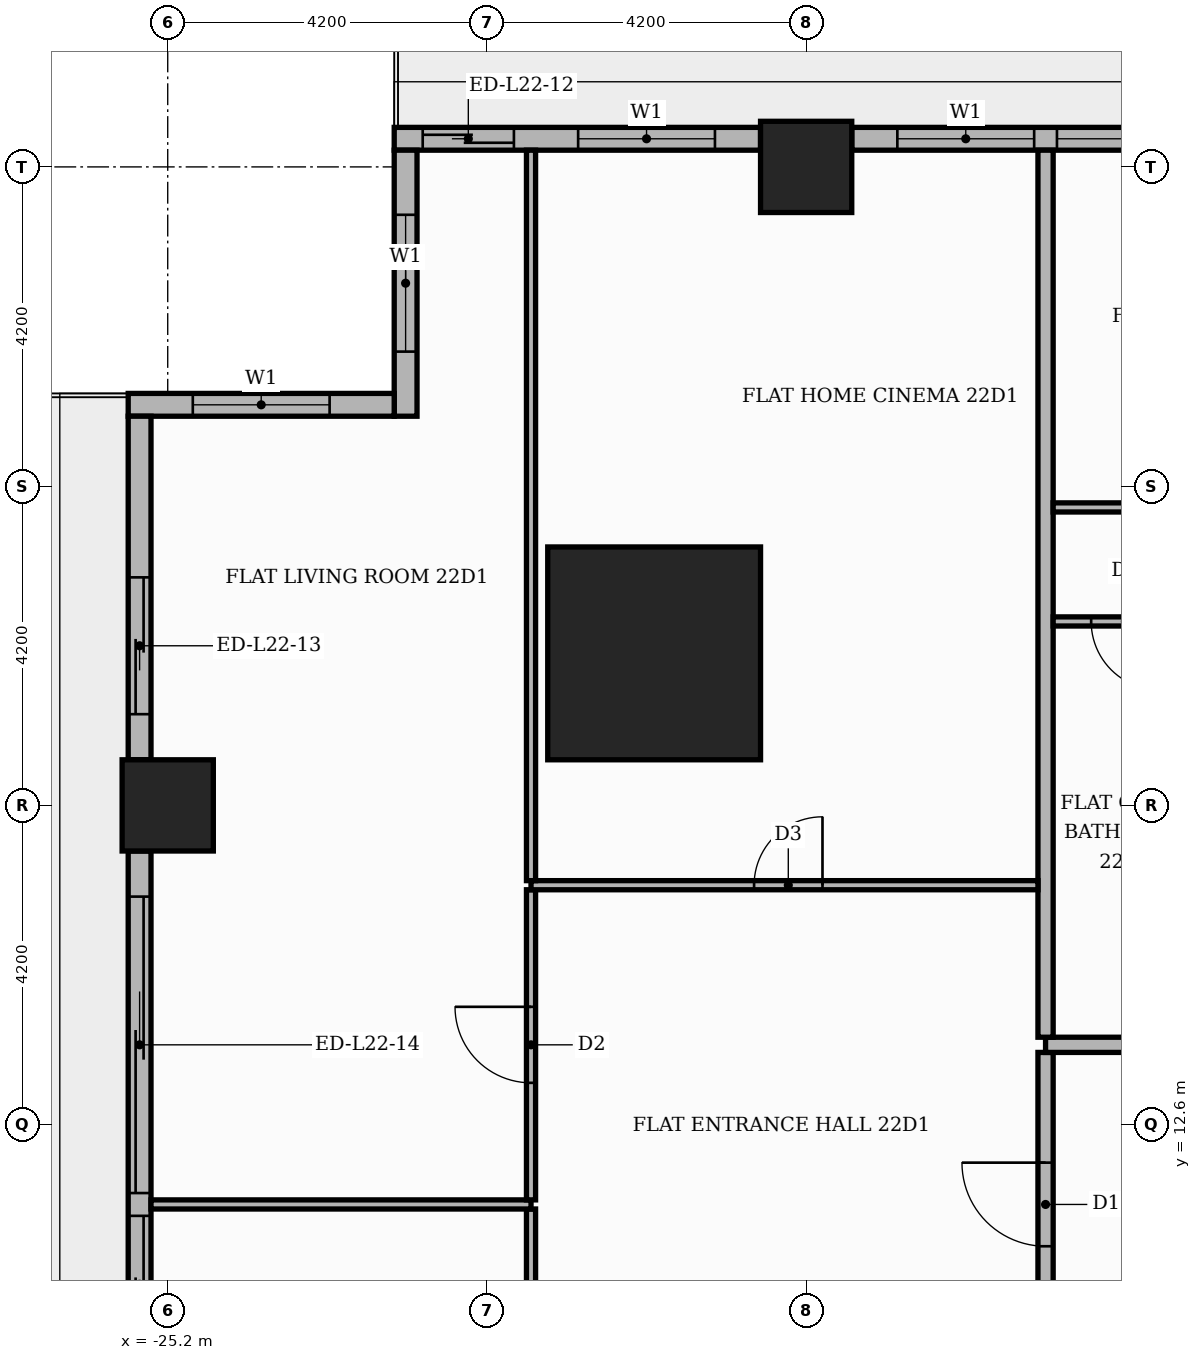
"""IFC4 building model, lengths in metres.
Left out: names, types, materials, properties, quantities, classifications, styles, units other than length and angle.
Written with IfcOpenShell. Run it as: python <this file> out.ifc"""

import sys

from ifc_helpers import new_model, si_unit, direction, frame, frame_2d, origin, origin_2d, place, context, subcontext, project, spatial, rectangle, extrude, element, fill, save


model = new_model("IFC4")
c1 = context("Model", 3, precision=1e-05, world=origin(), true_north=direction((0.0, 1.0)))
c2 = subcontext(c1, "Body", "Model", "MODEL_VIEW")
j1 = project(units=[si_unit("LENGTHUNIT", "METRE"), si_unit("PLANEANGLEUNIT", "RADIAN")], contexts=[c1])
p1 = place(None, origin())
s1 = spatial("IfcSite", under=j1, at=p1, CompositionType="ELEMENT")
p2 = place(p1, origin())
s2 = spatial("IfcBuilding", under=s1, at=p2, CompositionType="ELEMENT")
p3 = place(p2, frame((0.0, 0.0, 94.8)))
s3 = spatial("IfcBuildingStorey", under=s2, at=p3, CompositionType="ELEMENT", Elevation=94.8)
p4 = place(p3, frame((-18.8, 18.8, 0.0), z_axis=(0.0, 0.0, 1.0), x_axis=(1.0, 0.0, 0.0)))
e1 = element("IfcColumn", 1, at=p4, inside=s3, PredefinedType="COLUMN", context=c2, shape_type="SweptSolid", body=[
    extrude(rectangle(XDim=2.8, YDim=2.8, at=origin_2d()), origin(), (0.0, 0.0, 1.0), 3.9),
])
for number, where, z_axis, x_axis in (
    (2, (-16.8, 25.2, 0.0), (0.0, 0.0, 1.0), (1.0, 0.0, 0.0)),
    (3, (-25.2, 16.8, 0.0), (0.0, 0.0, 1.0), (1.0, 0.0, 0.0)),
):
    element("IfcColumn", number, at=place(p3, frame(where, z_axis=z_axis, x_axis=x_axis)), inside=s3, PredefinedType="COLUMN", context=c2, shape_type="SweptSolid", body=[
        extrude(rectangle(XDim=1.2, YDim=1.2, at=origin_2d()), origin(), (0.0, 0.0, 1.0), 3.9),
    ])
p5 = place(p3, frame((-9.0, 25.57, 0.0), z_axis=(0.0, 0.0, 1.0), x_axis=(-1.0, 0.0, 0.0)))
e4 = element("IfcWall", 4, at=p5, inside=s3, PredefinedType="STANDARD", context=c2, shape_type="SweptSolid", body=[
    extrude(rectangle(XDim=7.2, YDim=0.3, at=frame_2d((3.6, 0.0))), origin(), (0.0, 0.0, 1.0), 3.48),
])
p6 = place(p5, frame((0.6, 0.0, 0.9)))
e5 = element("IfcOpeningElement", 5, at=p6, cuts=e4, PredefinedType="OPENING", context=c2, shape_type="SweptSolid", body=[
    extrude(rectangle(XDim=3.9, YDim=2.1, at=frame_2d((1.95, 1.05))), frame((0.0, 0.16, 0.0), z_axis=(0.0, -1.0, 0.0), x_axis=(1.0, 0.0, 0.0)), (0.0, 0.0, 1.0), 0.32),
])
p7 = place(p5, frame((4.8, 0.0, 0.9)))
e6 = element("IfcOpeningElement", 6, at=p7, cuts=e4, PredefinedType="OPENING", context=c2, shape_type="SweptSolid", body=[
    extrude(rectangle(XDim=1.8, YDim=2.1, at=frame_2d((0.9, 1.05))), frame((0.0, 0.16, 0.0), z_axis=(0.0, -1.0, 0.0), x_axis=(1.0, 0.0, 0.0)), (0.0, 0.0, 1.0), 0.32),
])
p8 = place(p3, frame((-17.4, 25.57, 0.0), z_axis=(0.0, 0.0, 1.0), x_axis=(-1.0, 0.0, 0.0)))
e7 = element("IfcWall", 7, at=p8, inside=s3, PredefinedType="STANDARD", context=c2, shape_type="SweptSolid", body=[
    extrude(rectangle(XDim=4.82, YDim=0.3, at=frame_2d((2.41, 0.0))), origin(), (0.0, 0.0, 1.0), 3.48),
])
p9 = place(p8, frame((0.6, 0.0, 0.9)))
e8 = element("IfcOpeningElement", 8, at=p9, cuts=e7, PredefinedType="OPENING", context=c2, shape_type="SweptSolid", body=[
    extrude(rectangle(XDim=1.8, YDim=2.1, at=frame_2d((0.9, 1.05))), frame((0.0, 0.16, 0.0), z_axis=(0.0, -1.0, 0.0), x_axis=(1.0, 0.0, 0.0)), (0.0, 0.0, 1.0), 0.32),
])
p10 = place(p8, frame((3.245, 0.0, 0.0)))
e9 = element("IfcOpeningElement", 9, at=p10, cuts=e7, PredefinedType="OPENING", context=c2, shape_type="SweptSolid", body=[
    extrude(rectangle(XDim=1.2, YDim=2.4, at=frame_2d((0.6, 1.2))), frame((0.0, 0.16, 0.0), z_axis=(0.0, -1.0, 0.0), x_axis=(1.0, 0.0, 0.0)), (0.0, 0.0, 1.0), 0.32),
])
p11 = place(p3, frame((-22.07, 25.42, 0.0), z_axis=(0.0, 0.0, 1.0), x_axis=(0.0, -1.0, 0.0)))
e10 = element("IfcWall", 10, at=p11, inside=s3, PredefinedType="STANDARD", context=c2, shape_type="SweptSolid", body=[
    extrude(rectangle(XDim=3.5, YDim=0.3, at=frame_2d((1.75, 0.0))), origin(), (0.0, 0.0, 1.0), 3.48),
])
p12 = place(p11, frame((0.85, 0.0, 0.9)))
e11 = element("IfcOpeningElement", 11, at=p12, cuts=e10, PredefinedType="OPENING", context=c2, shape_type="SweptSolid", body=[
    extrude(rectangle(XDim=1.8, YDim=2.1, at=frame_2d((0.9, 1.05))), frame((0.0, 0.16, 0.0), z_axis=(0.0, -1.0, 0.0), x_axis=(1.0, 0.0, 0.0)), (0.0, 0.0, 1.0), 0.32),
])
p13 = place(p3, frame((-22.22, 22.07, 0.0), z_axis=(0.0, 0.0, 1.0), x_axis=(-1.0, 0.0, 0.0)))
e12 = element("IfcWall", 12, at=p13, inside=s3, PredefinedType="STANDARD", context=c2, shape_type="SweptSolid", body=[
    extrude(rectangle(XDim=3.5, YDim=0.3, at=frame_2d((1.75, 0.0))), origin(), (0.0, 0.0, 1.0), 3.48),
])
p14 = place(p13, frame((0.85, 0.0, 0.9)))
e13 = element("IfcOpeningElement", 13, at=p14, cuts=e12, PredefinedType="OPENING", context=c2, shape_type="SweptSolid", body=[
    extrude(rectangle(XDim=1.8, YDim=2.1, at=frame_2d((0.9, 1.05))), frame((0.0, 0.16, 0.0), z_axis=(0.0, -1.0, 0.0), x_axis=(1.0, 0.0, 0.0)), (0.0, 0.0, 1.0), 0.32),
])
p15 = place(p3, frame((-25.57, 21.92, 0.0), z_axis=(0.0, 0.0, 1.0), x_axis=(0.0, -1.0, 0.0)))
e14 = element("IfcWall", 14, at=p15, inside=s3, PredefinedType="STANDARD", context=c2, shape_type="SweptSolid", body=[
    extrude(rectangle(XDim=4.52, YDim=0.3, at=frame_2d((2.26, 0.0))), origin(), (0.0, 0.0, 1.0), 3.48),
])
p16 = place(p15, frame((2.12, 0.0, 0.0)))
e15 = element("IfcOpeningElement", 15, at=p16, cuts=e14, PredefinedType="OPENING", context=c2, shape_type="SweptSolid", body=[
    extrude(rectangle(XDim=1.8, YDim=2.4, at=frame_2d((0.9, 1.2))), frame((0.0, 0.16, 0.0), z_axis=(0.0, -1.0, 0.0), x_axis=(1.0, 0.0, 0.0)), (0.0, 0.0, 1.0), 0.32),
])
p17 = place(p3, frame((-25.57, 16.2, 0.0), z_axis=(0.0, 0.0, 1.0), x_axis=(0.0, -1.0, 0.0)))
e16 = element("IfcWall", 16, at=p17, inside=s3, PredefinedType="STANDARD", context=c2, shape_type="SweptSolid", body=[
    extrude(rectangle(XDim=7.2, YDim=0.3, at=frame_2d((3.6, 0.0))), origin(), (0.0, 0.0, 1.0), 3.48),
])
p18 = place(p17, frame((0.6, 0.0, 0.0)))
e17 = element("IfcOpeningElement", 17, at=p18, cuts=e16, PredefinedType="OPENING", context=c2, shape_type="SweptSolid", body=[
    extrude(rectangle(XDim=3.9, YDim=2.4, at=frame_2d((1.95, 1.2))), frame((0.0, 0.16, 0.0), z_axis=(0.0, -1.0, 0.0), x_axis=(1.0, 0.0, 0.0)), (0.0, 0.0, 1.0), 0.32),
])
p19 = place(p17, frame((4.8, 0.0, 0.0)))
e18 = element("IfcOpeningElement", 18, at=p19, cuts=e16, PredefinedType="OPENING", context=c2, shape_type="SweptSolid", body=[
    extrude(rectangle(XDim=1.8, YDim=2.4, at=frame_2d((0.9, 1.2))), frame((0.0, 0.16, 0.0), z_axis=(0.0, -1.0, 0.0), x_axis=(1.0, 0.0, 0.0)), (0.0, 0.0, 1.0), 0.32),
])
p20 = place(p3, frame((-13.65, -13.55, 0.0), z_axis=(0.0, 0.0, 1.0), x_axis=(0.0, 1.0, 0.0)))
e19 = element("IfcWall", 19, at=p20, inside=s3, PredefinedType="PARTITIONING", context=c2, shape_type="SweptSolid", body=[
    extrude(rectangle(XDim=27.1, YDim=0.2, at=frame_2d((13.55, 0.0))), origin(), (0.0, 0.0, 1.0), 3.48),
])
p21 = place(p20, frame((24.55, 0.0, 0.0)))
e20 = element("IfcOpeningElement", 20, at=p21, cuts=e19, PredefinedType="OPENING", context=c2, shape_type="SweptSolid", body=[
    extrude(rectangle(XDim=1.1, YDim=2.4, at=frame_2d((0.55, 1.2))), frame((0.0, 0.11, 0.0), z_axis=(0.0, -1.0, 0.0), x_axis=(1.0, 0.0, 0.0)), (0.0, 0.0, 1.0), 0.22),
])
p22 = place(p3, frame((-20.42, 7.41, 0.0), z_axis=(0.0, 0.0, 1.0), x_axis=(0.0, 1.0, 0.0)))
e21 = element("IfcWall", 21, at=p22, inside=s3, PredefinedType="PARTITIONING", context=c2, shape_type="SweptSolid", body=[
    extrude(rectangle(XDim=4.08, YDim=0.12, at=frame_2d((2.04, 0.0))), origin(), (0.0, 0.0, 1.0), 3.48),
])
p23 = place(p22, frame((1.54, 0.0, 0.0)))
e22 = element("IfcOpeningElement", 22, at=p23, cuts=e21, PredefinedType="OPENING", context=c2, shape_type="SweptSolid", body=[
    extrude(rectangle(XDim=1.0, YDim=2.1, at=frame_2d((0.5, 1.05))), frame((0.0, 0.07, 0.0), z_axis=(0.0, -1.0, 0.0), x_axis=(1.0, 0.0, 0.0)), (0.0, 0.0, 1.0), 0.14),
])
p24 = place(p3, frame((-25.42, 11.55, 0.0), z_axis=(0.0, 0.0, 1.0), x_axis=(1.0, 0.0, 0.0)))
e23 = element("IfcWall", 23, at=p24, inside=s3, PredefinedType="PARTITIONING", context=c2, shape_type="SweptSolid", body=[
    extrude(rectangle(XDim=5.0, YDim=0.12, at=frame_2d((2.5, 0.0))), origin(), (0.0, 0.0, 1.0), 3.48),
])
p25 = place(p3, frame((-20.42, 11.61, 0.0), z_axis=(0.0, 0.0, 1.0), x_axis=(0.0, 1.0, 0.0)))
e24 = element("IfcWall", 24, at=p25, inside=s3, PredefinedType="PARTITIONING", context=c2, shape_type="SweptSolid", body=[
    extrude(rectangle(XDim=4.08, YDim=0.12, at=frame_2d((2.04, 0.0))), origin(), (0.0, 0.0, 1.0), 3.48),
])
p26 = place(p25, frame((1.54, 0.0, 0.0)))
e25 = element("IfcOpeningElement", 25, at=p26, cuts=e24, PredefinedType="OPENING", context=c2, shape_type="SweptSolid", body=[
    extrude(rectangle(XDim=1.0, YDim=2.1, at=frame_2d((0.5, 1.05))), frame((0.0, 0.07, 0.0), z_axis=(0.0, -1.0, 0.0), x_axis=(1.0, 0.0, 0.0)), (0.0, 0.0, 1.0), 0.14),
])
p27 = place(p3, frame((-13.65, 13.65, 0.0), z_axis=(0.0, 0.0, 1.0), x_axis=(1.0, 0.0, 0.0)))
e26 = element("IfcWall", 26, at=p27, inside=s3, PredefinedType="PARTITIONING", context=c2, shape_type="SweptSolid", body=[
    extrude(rectangle(XDim=39.07, YDim=0.2, at=frame_2d((19.535, 0.0))), origin(), (0.0, 0.0, 1.0), 3.48),
])
p28 = place(p27, frame((24.65, 0.0, 0.0)))
e27 = element("IfcOpeningElement", 27, at=p28, cuts=e26, PredefinedType="OPENING", context=c2, shape_type="SweptSolid", body=[
    extrude(rectangle(XDim=1.1, YDim=2.4, at=frame_2d((0.55, 1.2))), frame((0.0, 0.11, 0.0), z_axis=(0.0, -1.0, 0.0), x_axis=(1.0, 0.0, 0.0)), (0.0, 0.0, 1.0), 0.22),
])
p29 = place(p27, frame((16.25, 0.0, 0.0)))
e28 = element("IfcOpeningElement", 28, at=p29, cuts=e26, PredefinedType="OPENING", context=c2, shape_type="SweptSolid", body=[
    extrude(rectangle(XDim=1.1, YDim=2.4, at=frame_2d((0.55, 1.2))), frame((0.0, 0.11, 0.0), z_axis=(0.0, -1.0, 0.0), x_axis=(1.0, 0.0, 0.0)), (0.0, 0.0, 1.0), 0.22),
])
p30 = place(p3, frame((-13.65, 13.75, 0.0), z_axis=(0.0, 0.0, 1.0), x_axis=(0.0, 1.0, 0.0)))
e29 = element("IfcWall", 29, at=p30, inside=s3, PredefinedType="PARTITIONING", context=c2, shape_type="SweptSolid", body=[
    extrude(rectangle(XDim=11.67, YDim=0.2, at=frame_2d((5.835, 0.0))), origin(), (0.0, 0.0, 1.0), 3.48),
])
p31 = place(p3, frame((-20.42, 15.75, 0.0), z_axis=(0.0, 0.0, 1.0), x_axis=(1.0, 0.0, 0.0)))
e30 = element("IfcWall", 30, at=p31, inside=s3, PredefinedType="PARTITIONING", context=c2, shape_type="SweptSolid", body=[
    extrude(rectangle(XDim=6.67, YDim=0.12, at=frame_2d((3.335, 0.0))), origin(), (0.0, 0.0, 1.0), 3.48),
])
p32 = place(p31, frame((2.935, 0.0, 0.0)))
e31 = element("IfcOpeningElement", 31, at=p32, cuts=e30, PredefinedType="OPENING", context=c2, shape_type="SweptSolid", body=[
    extrude(rectangle(XDim=0.9, YDim=2.1, at=frame_2d((0.45, 1.05))), frame((0.0, 0.07, 0.0), z_axis=(0.0, -1.0, 0.0), x_axis=(1.0, 0.0, 0.0)), (0.0, 0.0, 1.0), 0.14),
])
p33 = place(p3, frame((-20.42, 15.81, 0.0), z_axis=(0.0, 0.0, 1.0), x_axis=(0.0, 1.0, 0.0)))
e32 = element("IfcWall", 32, at=p33, inside=s3, PredefinedType="PARTITIONING", context=c2, shape_type="SweptSolid", body=[
    extrude(rectangle(XDim=9.61, YDim=0.12, at=frame_2d((4.805, 0.0))), origin(), (0.0, 0.0, 1.0), 3.48),
])
p34 = place(p3, frame((-13.55, 19.22, 0.0), z_axis=(0.0, 0.0, 1.0), x_axis=(1.0, 0.0, 0.0)))
e33 = element("IfcWall", 33, at=p34, inside=s3, PredefinedType="PARTITIONING", context=c2, shape_type="SweptSolid", body=[
    extrude(rectangle(XDim=14.6, YDim=0.12, at=frame_2d((7.3, 0.0))), origin(), (0.0, 0.0, 1.0), 3.48),
])
p35 = place(p34, frame((11.0, 0.0, 0.0)))
e34 = element("IfcOpeningElement", 34, at=p35, cuts=e33, PredefinedType="OPENING", context=c2, shape_type="SweptSolid", body=[
    extrude(rectangle(XDim=0.9, YDim=2.1, at=frame_2d((0.45, 1.05))), frame((0.0, 0.07, 0.0), z_axis=(0.0, -1.0, 0.0), x_axis=(1.0, 0.0, 0.0)), (0.0, 0.0, 1.0), 0.14),
])
p36 = place(p34, frame((6.65, 0.0, 0.0)))
e35 = element("IfcOpeningElement", 35, at=p36, cuts=e33, PredefinedType="OPENING", context=c2, shape_type="SweptSolid", body=[
    extrude(rectangle(XDim=0.9, YDim=2.1, at=frame_2d((0.45, 1.05))), frame((0.0, 0.07, 0.0), z_axis=(0.0, -1.0, 0.0), x_axis=(1.0, 0.0, 0.0)), (0.0, 0.0, 1.0), 0.14),
])
p37 = place(p34, frame((4.55, 0.0, 0.0)))
e36 = element("IfcOpeningElement", 36, at=p37, cuts=e33, PredefinedType="OPENING", context=c2, shape_type="SweptSolid", body=[
    extrude(rectangle(XDim=0.9, YDim=2.1, at=frame_2d((0.45, 1.05))), frame((0.0, 0.07, 0.0), z_axis=(0.0, -1.0, 0.0), x_axis=(1.0, 0.0, 0.0)), (0.0, 0.0, 1.0), 0.14),
])
p38 = place(p34, frame((2.6, 0.0, 0.0)))
e37 = element("IfcOpeningElement", 37, at=p38, cuts=e33, PredefinedType="OPENING", context=c2, shape_type="SweptSolid", body=[
    extrude(rectangle(XDim=0.9, YDim=2.1, at=frame_2d((0.45, 1.05))), frame((0.0, 0.07, 0.0), z_axis=(0.0, -1.0, 0.0), x_axis=(1.0, 0.0, 0.0)), (0.0, 0.0, 1.0), 0.14),
])
p39 = place(p34, frame((0.5, 0.0, 0.0)))
e38 = element("IfcOpeningElement", 38, at=p39, cuts=e33, PredefinedType="OPENING", context=c2, shape_type="SweptSolid", body=[
    extrude(rectangle(XDim=0.9, YDim=2.1, at=frame_2d((0.45, 1.05))), frame((0.0, 0.07, 0.0), z_axis=(0.0, -1.0, 0.0), x_axis=(1.0, 0.0, 0.0)), (0.0, 0.0, 1.0), 0.14),
])
p40 = place(p3, frame((-13.55, 20.72, 0.0), z_axis=(0.0, 0.0, 1.0), x_axis=(1.0, 0.0, 0.0)))
e39 = element("IfcWall", 39, at=p40, inside=s3, PredefinedType="PARTITIONING", context=c2, shape_type="SweptSolid", body=[
    extrude(rectangle(XDim=18.7, YDim=0.12, at=frame_2d((9.35, 0.0))), origin(), (0.0, 0.0, 1.0), 3.48),
])
p41 = place(p40, frame((15.15, 0.0, 0.0)))
e40 = element("IfcOpeningElement", 40, at=p41, cuts=e39, PredefinedType="OPENING", context=c2, shape_type="SweptSolid", body=[
    extrude(rectangle(XDim=1.0, YDim=2.1, at=frame_2d((0.5, 1.05))), frame((0.0, 0.07, 0.0), z_axis=(0.0, -1.0, 0.0), x_axis=(1.0, 0.0, 0.0)), (0.0, 0.0, 1.0), 0.14),
])
p42 = place(p40, frame((9.95, 0.0, 0.0)))
e41 = element("IfcOpeningElement", 41, at=p42, cuts=e39, PredefinedType="OPENING", context=c2, shape_type="SweptSolid", body=[
    extrude(rectangle(XDim=0.9, YDim=2.1, at=frame_2d((0.45, 1.05))), frame((0.0, 0.07, 0.0), z_axis=(0.0, -1.0, 0.0), x_axis=(1.0, 0.0, 0.0)), (0.0, 0.0, 1.0), 0.14),
])
p43 = place(p40, frame((1.55, 0.0, 0.0)))
e42 = element("IfcOpeningElement", 42, at=p43, cuts=e39, PredefinedType="OPENING", context=c2, shape_type="SweptSolid", body=[
    extrude(rectangle(XDim=0.9, YDim=2.1, at=frame_2d((0.45, 1.05))), frame((0.0, 0.07, 0.0), z_axis=(0.0, -1.0, 0.0), x_axis=(1.0, 0.0, 0.0)), (0.0, 0.0, 1.0), 0.14),
])
p44 = place(p6, origin())
e43 = element("IfcWindow", 43, at=p44, inside=s3, PartitioningType="SINGLE_PANEL", PredefinedType="WINDOW", context=c2, shape_type="SweptSolid", body=[
    extrude(rectangle(XDim=3.9, YDim=2.1, at=frame_2d((1.95, 1.05))), frame((0.0, 0.03, 0.0), z_axis=(0.0, -1.0, 0.0), x_axis=(1.0, 0.0, 0.0)), (0.0, 0.0, 1.0), 0.06),
])
fill(e5, e43)
p45 = place(p7, origin())
e44 = element("IfcWindow", 44, at=p45, inside=s3, PartitioningType="SINGLE_PANEL", PredefinedType="WINDOW", context=c2, shape_type="SweptSolid", body=[
    extrude(rectangle(XDim=1.8, YDim=2.1, at=frame_2d((0.9, 1.05))), frame((0.0, 0.03, 0.0), z_axis=(0.0, -1.0, 0.0), x_axis=(1.0, 0.0, 0.0)), (0.0, 0.0, 1.0), 0.06),
])
fill(e6, e44)
p46 = place(p9, origin())
e45 = element("IfcWindow", 45, at=p46, inside=s3, PartitioningType="SINGLE_PANEL", PredefinedType="WINDOW", context=c2, shape_type="SweptSolid", body=[
    extrude(rectangle(XDim=1.8, YDim=2.1, at=frame_2d((0.9, 1.05))), frame((0.0, 0.03, 0.0), z_axis=(0.0, -1.0, 0.0), x_axis=(1.0, 0.0, 0.0)), (0.0, 0.0, 1.0), 0.06),
])
fill(e8, e45)
p47 = place(p10, origin())
e46 = element("IfcDoor", 46, at=p47, inside=s3, OperationType="SLIDING_TO_RIGHT", PredefinedType="DOOR", context=c2, shape_type="SweptSolid", body=[
    extrude(rectangle(XDim=1.2, YDim=2.4, at=frame_2d((0.6, 1.2))), frame((0.0, 0.025, 0.0), z_axis=(0.0, -1.0, 0.0), x_axis=(1.0, 0.0, 0.0)), (0.0, 0.0, 1.0), 0.05),
])
fill(e9, e46)
p48 = place(p12, origin())
e47 = element("IfcWindow", 47, at=p48, inside=s3, PartitioningType="SINGLE_PANEL", PredefinedType="WINDOW", context=c2, shape_type="SweptSolid", body=[
    extrude(rectangle(XDim=1.8, YDim=2.1, at=frame_2d((0.9, 1.05))), frame((0.0, 0.03, 0.0), z_axis=(0.0, -1.0, 0.0), x_axis=(1.0, 0.0, 0.0)), (0.0, 0.0, 1.0), 0.06),
])
fill(e11, e47)
p49 = place(p14, origin())
e48 = element("IfcWindow", 48, at=p49, inside=s3, PartitioningType="SINGLE_PANEL", PredefinedType="WINDOW", context=c2, shape_type="SweptSolid", body=[
    extrude(rectangle(XDim=1.8, YDim=2.1, at=frame_2d((0.9, 1.05))), frame((0.0, 0.03, 0.0), z_axis=(0.0, -1.0, 0.0), x_axis=(1.0, 0.0, 0.0)), (0.0, 0.0, 1.0), 0.06),
])
fill(e13, e48)
p50 = place(p16, origin())
e49 = element("IfcDoor", 49, at=p50, inside=s3, OperationType="SLIDING_TO_RIGHT", PredefinedType="DOOR", context=c2, shape_type="SweptSolid", body=[
    extrude(rectangle(XDim=1.8, YDim=2.4, at=frame_2d((0.9, 1.2))), frame((0.0, 0.025, 0.0), z_axis=(0.0, -1.0, 0.0), x_axis=(1.0, 0.0, 0.0)), (0.0, 0.0, 1.0), 0.05),
])
fill(e15, e49)
p51 = place(p18, origin())
e50 = element("IfcDoor", 50, at=p51, inside=s3, OperationType="SLIDING_TO_LEFT", PredefinedType="DOOR", context=c2, shape_type="SweptSolid", body=[
    extrude(rectangle(XDim=3.9, YDim=2.4, at=frame_2d((1.95, 1.2))), frame((0.0, 0.025, 0.0), z_axis=(0.0, -1.0, 0.0), x_axis=(1.0, 0.0, 0.0)), (0.0, 0.0, 1.0), 0.05),
])
fill(e17, e50)
p52 = place(p19, origin())
e51 = element("IfcDoor", 51, at=p52, inside=s3, OperationType="SLIDING_TO_RIGHT", PredefinedType="DOOR", context=c2, shape_type="SweptSolid", body=[
    extrude(rectangle(XDim=1.8, YDim=2.4, at=frame_2d((0.9, 1.2))), frame((0.0, 0.025, 0.0), z_axis=(0.0, -1.0, 0.0), x_axis=(1.0, 0.0, 0.0)), (0.0, 0.0, 1.0), 0.05),
])
fill(e18, e51)
p53 = place(p39, frame((0.9, 0.0, 0.0), z_axis=(0.0, 0.0, 1.0), x_axis=(-1.0, 0.0, 0.0)))
e52 = element("IfcDoor", 52, at=p53, inside=s3, OperationType="SINGLE_SWING_RIGHT", PredefinedType="DOOR", context=c2, shape_type="SweptSolid", body=[
    extrude(rectangle(XDim=0.9, YDim=2.1, at=frame_2d((0.45, 1.05))), frame((0.0, 0.025, 0.0), z_axis=(0.0, -1.0, 0.0), x_axis=(1.0, 0.0, 0.0)), (0.0, 0.0, 1.0), 0.05),
])
fill(e38, e52)
p54 = place(p21, origin())
e53 = element("IfcDoor", 53, at=p54, inside=s3, OperationType="SINGLE_SWING_RIGHT", PredefinedType="DOOR", context=c2, shape_type="SweptSolid", body=[
    extrude(rectangle(XDim=1.1, YDim=2.4, at=frame_2d((0.55, 1.2))), frame((0.0, 0.025, 0.0), z_axis=(0.0, -1.0, 0.0), x_axis=(1.0, 0.0, 0.0)), (0.0, 0.0, 1.0), 0.05),
])
fill(e20, e53)
p55 = place(p32, origin())
e54 = element("IfcDoor", 54, at=p55, inside=s3, OperationType="SINGLE_SWING_RIGHT", PredefinedType="DOOR", context=c2, shape_type="SweptSolid", body=[
    extrude(rectangle(XDim=0.9, YDim=2.1, at=frame_2d((0.45, 1.05))), frame((0.0, 0.025, 0.0), z_axis=(0.0, -1.0, 0.0), x_axis=(1.0, 0.0, 0.0)), (0.0, 0.0, 1.0), 0.05),
])
fill(e31, e54)
p56 = place(p26, origin())
e55 = element("IfcDoor", 55, at=p56, inside=s3, OperationType="SINGLE_SWING_RIGHT", PredefinedType="DOOR", context=c2, shape_type="SweptSolid", body=[
    extrude(rectangle(XDim=1.0, YDim=2.1, at=frame_2d((0.5, 1.05))), frame((0.0, 0.025, 0.0), z_axis=(0.0, -1.0, 0.0), x_axis=(1.0, 0.0, 0.0)), (0.0, 0.0, 1.0), 0.05),
])
fill(e25, e55)
save(model, sys.argv[1])
